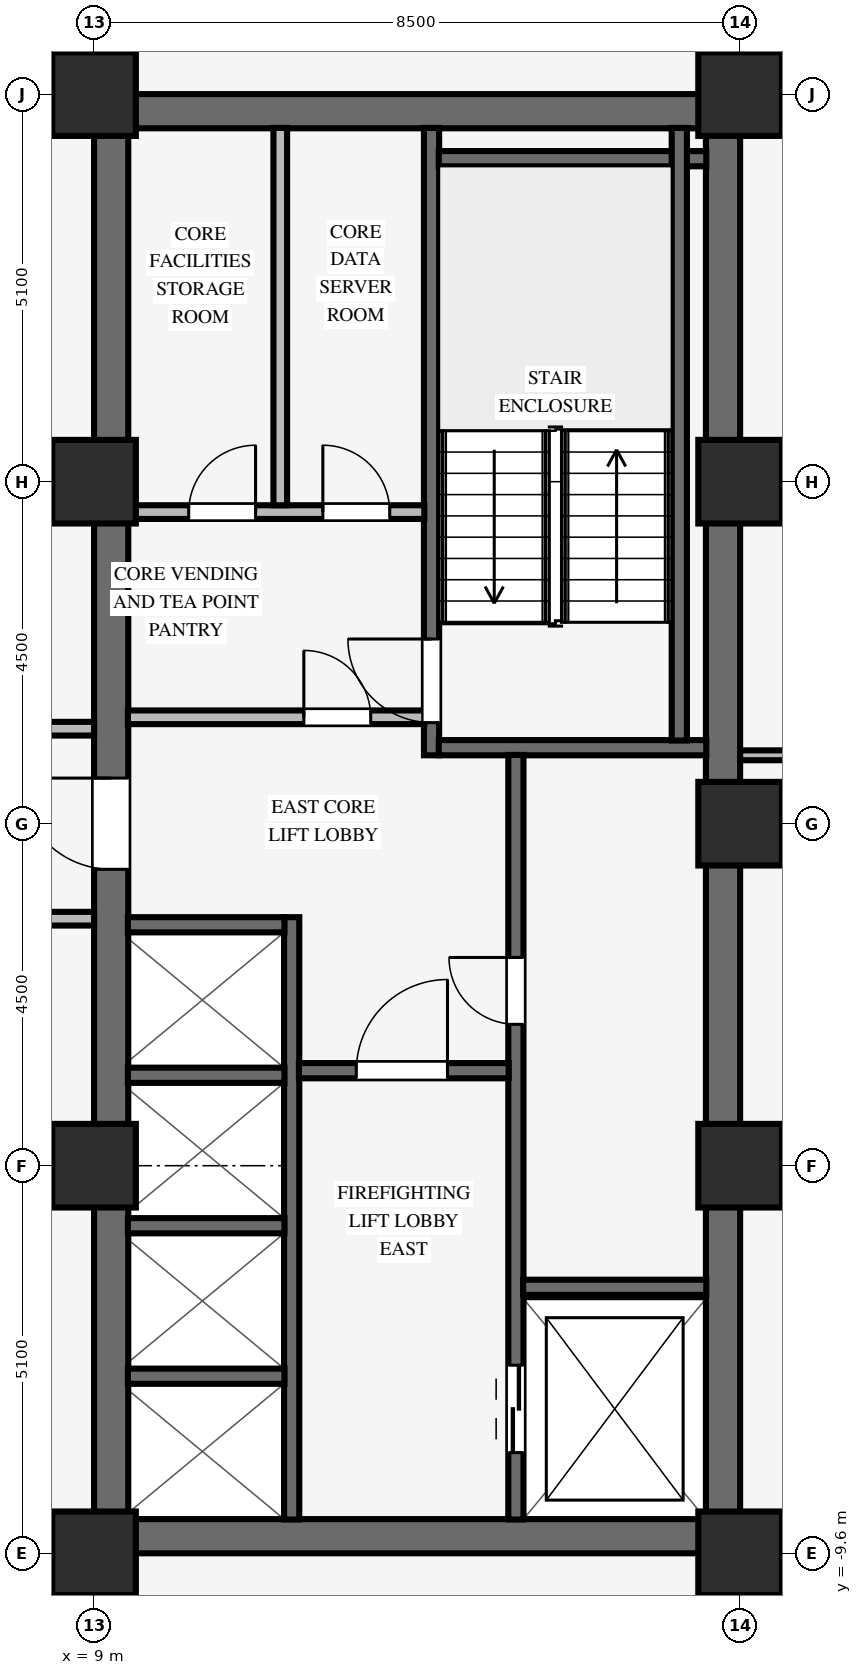
"""IFC4 building model, lengths in metres.
Left out: names, types, materials, properties, quantities, classifications, styles, units other than length and angle.
Written with IfcOpenShell. Run it as: python <this file> out.ifc"""

import sys

from ifc_helpers import new_model, si_unit, direction, frame, frame_2d, origin, origin_2d, place, context, subcontext, project, spatial, rectangle, extrude, source, transform, mapped, element, fill, save


model = new_model("IFC4")
c1 = context("Model", 3, precision=1e-05, world=origin(), true_north=direction((0.0, 1.0)))
c2 = subcontext(c1, "Body", "Model", "MODEL_VIEW")
j1 = project(units=[si_unit("LENGTHUNIT", "METRE"), si_unit("PLANEANGLEUNIT", "RADIAN")], contexts=[c1])
p1 = place(None, origin())
s1 = spatial("IfcSite", under=j1, at=p1, CompositionType="ELEMENT")
p2 = place(p1, origin())
s2 = spatial("IfcBuilding", under=s1, at=p2, CompositionType="ELEMENT")
p3 = place(p2, frame((0.0, 0.0, 67.75)))
s3 = spatial("IfcBuildingStorey", under=s2, at=p3, CompositionType="ELEMENT", Elevation=67.75)
for number, where, z_axis, x_axis in (
    (1, (9.0, -9.375, 0.0), (0.0, 0.0, 1.0), (1.0, 0.0, 0.0)),
    (2, (9.0, 9.375, 0.0), (0.0, 0.0, 1.0), (1.0, 0.0, 0.0)),
):
    element("IfcWall", number, at=place(p3, frame(where, z_axis=z_axis, x_axis=x_axis)), inside=s3, PredefinedType="SHEAR", context=c2, shape_type="SweptSolid", body=[
        extrude(rectangle(XDim=8.5, YDim=0.45, at=frame_2d((4.25, 0.0))), origin(), (0.0, 0.0, 1.0), 3.37),
    ])
p4 = place(p3, frame((9.225, -9.155, 0.0), z_axis=(0.0, 0.0, 1.0), x_axis=(0.0, 1.0, 0.0)))
e3 = element("IfcWall", 3, at=p4, inside=s3, PredefinedType="SHEAR", context=c2, shape_type="SweptSolid", body=[
    extrude(rectangle(XDim=18.31, YDim=0.45, at=frame_2d((9.155, 0.0))), origin(), (0.0, 0.0, 1.0), 3.37),
])
p5 = place(p4, frame((8.555, 0.0, 0.0)))
e4 = element("IfcOpeningElement", 4, at=p5, cuts=e3, PredefinedType="OPENING", context=c2, shape_type="SweptSolid", body=[
    extrude(rectangle(XDim=1.2, YDim=2.15, at=frame_2d((0.6, 1.075))), frame((0.0, 0.235, 0.0), z_axis=(0.0, -1.0, 0.0), x_axis=(1.0, 0.0, 0.0)), (0.0, 0.0, 1.0), 0.47),
])
p6 = place(p3, frame((17.275, -9.155, 0.0), z_axis=(0.0, 0.0, 1.0), x_axis=(0.0, 1.0, 0.0)))
e5 = element("IfcWall", 5, at=p6, inside=s3, PredefinedType="SHEAR", context=c2, shape_type="SweptSolid", body=[
    extrude(rectangle(XDim=18.31, YDim=0.45, at=frame_2d((9.155, 0.0))), origin(), (0.0, 0.0, 1.0), 3.37),
])
for number, where, z_axis, x_axis in (
    (6, (9.0, -9.6, 0.0), (0.0, 0.0, 1.0), (1.0, 0.0, 0.0)),
    (7, (9.0, -4.5, 0.0), (0.0, 0.0, 1.0), (1.0, 0.0, 0.0)),
    (8, (9.0, 4.5, 0.0), (0.0, 0.0, 1.0), (1.0, 0.0, 0.0)),
    (9, (9.0, 9.6, 0.0), (0.0, 0.0, 1.0), (1.0, 0.0, 0.0)),
    (10, (17.5, -9.6, 0.0), (0.0, 0.0, 1.0), (1.0, 0.0, 0.0)),
    (11, (17.5, -4.5, 0.0), (0.0, 0.0, 1.0), (1.0, 0.0, 0.0)),
    (12, (17.5, 4.5, 0.0), (0.0, 0.0, 1.0), (1.0, 0.0, 0.0)),
    (13, (17.5, 9.6, 0.0), (0.0, 0.0, 1.0), (1.0, 0.0, 0.0)),
    (14, (17.5, 0.0, 0.0), (0.0, 0.0, 1.0), (1.0, 0.0, 0.0)),
):
    element("IfcColumn", number, at=place(p3, frame(where, z_axis=z_axis, x_axis=x_axis)), inside=s3, PredefinedType="COLUMN", context=c2, shape_type="SweptSolid", body=[
        extrude(rectangle(XDim=1.1, YDim=1.1, at=origin_2d()), origin(), (0.0, 0.0, 1.0), 3.37),
    ])
p7 = place(p3, frame((13.44, 0.9, 0.0), z_axis=(0.0, 0.0, 1.0), x_axis=(0.0, 1.0, 0.0)))
e15 = element("IfcWall", 15, at=p7, inside=s3, PredefinedType="SHEAR", context=c2, shape_type="SweptSolid", body=[
    extrude(rectangle(XDim=8.255, YDim=0.2, at=frame_2d((4.127, 0.0))), origin(), (0.0, 0.0, 1.0), 3.37),
])
p8 = place(p7, frame((0.43, 0.0, 0.0)))
e16 = element("IfcOpeningElement", 16, at=p8, cuts=e15, PredefinedType="OPENING", context=c2, shape_type="SweptSolid", body=[
    extrude(rectangle(XDim=1.1, YDim=2.15, at=frame_2d((0.55, 1.075))), frame((0.0, 0.11, 0.0), z_axis=(0.0, -1.0, 0.0), x_axis=(1.0, 0.0, 0.0)), (0.0, 0.0, 1.0), 0.22),
])
for number, where, z_axis, x_axis in (
    (17, (13.535, 1.0, 0.0), (0.0, 0.0, 1.0), (1.0, 0.0, 0.0)),
    (18, (13.535, 8.75, 0.0), (0.0, 0.0, 1.0), (1.0, 0.0, 0.0)),
):
    element("IfcWall", number, at=place(p3, frame(where, z_axis=z_axis, x_axis=x_axis)), inside=s3, PredefinedType="SHEAR", context=c2, shape_type="SweptSolid", body=[
        extrude(rectangle(XDim=3.52, YDim=0.2, at=frame_2d((1.76, 0.0))), origin(), (0.0, 0.0, 1.0), 3.37),
    ])
p9 = place(p3, frame((16.7, 1.095, 0.0), z_axis=(0.0, 0.0, 1.0), x_axis=(0.0, 1.0, 0.0)))
e19 = element("IfcWall", 19, at=p9, inside=s3, PredefinedType="SHEAR", context=c2, shape_type="SweptSolid", body=[
    extrude(rectangle(XDim=8.06, YDim=0.2, at=frame_2d((4.03, 0.0))), origin(), (0.0, 0.0, 1.0), 3.37),
])
p10 = place(p3, frame((14.55, -9.155, 0.0), z_axis=(0.0, 0.0, 1.0), x_axis=(0.0, 1.0, 0.0)))
e20 = element("IfcWall", 20, at=p10, inside=s3, PredefinedType="SHEAR", context=c2, shape_type="SweptSolid", body=[
    extrude(rectangle(XDim=10.06, YDim=0.2, at=frame_2d((5.03, 0.0))), origin(), (0.0, 0.0, 1.0), 3.37),
])
p11 = place(p10, frame((6.515, 0.0, 0.0)))
e21 = element("IfcOpeningElement", 21, at=p11, cuts=e20, PredefinedType="OPENING", context=c2, shape_type="SweptSolid", body=[
    extrude(rectangle(XDim=0.88, YDim=2.1, at=frame_2d((0.44, 1.05))), frame((0.0, 0.11, 0.0), z_axis=(0.0, -1.0, 0.0), x_axis=(1.0, 0.0, 0.0)), (0.0, 0.0, 1.0), 0.22),
])
p12 = place(p10, frame((0.88, 0.0, 0.0)))
e22 = element("IfcOpeningElement", 22, at=p12, cuts=e20, PredefinedType="OPENING", context=c2, shape_type="SweptSolid", body=[
    extrude(rectangle(XDim=1.15, YDim=2.15, at=frame_2d((0.575, 1.075))), frame((0.0, 0.11, 0.0), z_axis=(0.0, -1.0, 0.0), x_axis=(1.0, 0.0, 0.0)), (0.0, 0.0, 1.0), 0.22),
])
p13 = place(p3, frame((14.645, -6.1, 0.0), z_axis=(0.0, 0.0, 1.0), x_axis=(1.0, 0.0, 0.0)))
e23 = element("IfcWall", 23, at=p13, inside=s3, PredefinedType="SHEAR", context=c2, shape_type="SweptSolid", body=[
    extrude(rectangle(XDim=2.41, YDim=0.2, at=frame_2d((1.205, 0.0))), origin(), (0.0, 0.0, 1.0), 3.37),
])
p14 = place(p3, frame((11.6, -9.155, 0.0), z_axis=(0.0, 0.0, 1.0), x_axis=(0.0, 1.0, 0.0)))
e24 = element("IfcWall", 24, at=p14, inside=s3, PredefinedType="SHEAR", context=c2, shape_type="SweptSolid", body=[
    extrude(rectangle(XDim=7.925, YDim=0.2, at=frame_2d((3.962, 0.0))), origin(), (0.0, 0.0, 1.0), 3.37),
])
p15 = place(p3, frame((11.695, -3.25, 0.0), z_axis=(0.0, 0.0, 1.0), x_axis=(1.0, 0.0, 0.0)))
e25 = element("IfcWall", 25, at=p15, inside=s3, PredefinedType="SHEAR", context=c2, shape_type="SweptSolid", body=[
    extrude(rectangle(XDim=2.76, YDim=0.2, at=frame_2d((1.38, 0.0))), origin(), (0.0, 0.0, 1.0), 3.37),
])
p16 = place(p15, frame((0.755, 0.0, 0.0)))
e26 = element("IfcOpeningElement", 26, at=p16, cuts=e25, PredefinedType="OPENING", context=c2, shape_type="SweptSolid", body=[
    extrude(rectangle(XDim=1.2, YDim=2.15, at=frame_2d((0.6, 1.075))), frame((0.0, 0.11, 0.0), z_axis=(0.0, -1.0, 0.0), x_axis=(1.0, 0.0, 0.0)), (0.0, 0.0, 1.0), 0.22),
])
for number, where, z_axis, x_axis in (
    (27, (9.445, -7.27, 0.0), (0.0, 0.0, 1.0), (1.0, 0.0, 0.0)),
    (28, (9.445, -5.29, 0.0), (0.0, 0.0, 1.0), (1.0, 0.0, 0.0)),
    (29, (9.445, -3.31, 0.0), (0.0, 0.0, 1.0), (1.0, 0.0, 0.0)),
    (30, (9.445, -1.33, 0.0), (0.0, 0.0, 1.0), (1.0, 0.0, 0.0)),
):
    element("IfcWall", number, at=place(p3, frame(where, z_axis=z_axis, x_axis=x_axis)), inside=s3, PredefinedType="SHEAR", context=c2, shape_type="SweptSolid", body=[
        extrude(rectangle(XDim=2.06, YDim=0.2, at=frame_2d((1.03, 0.0))), origin(), (0.0, 0.0, 1.0), 3.37),
    ])
p17 = place(p3, frame((9.445, 1.4, 0.0), z_axis=(0.0, 0.0, 1.0), x_axis=(1.0, 0.0, 0.0)))
e31 = element("IfcWall", 31, at=p17, inside=s3, PredefinedType="PARTITIONING", context=c2, shape_type="SweptSolid", body=[
    extrude(rectangle(XDim=3.9, YDim=0.18, at=frame_2d((1.95, 0.0))), origin(), (0.0, 0.0, 1.0), 3.36),
])
p18 = place(p17, frame((2.315, 0.0, 0.0)))
e32 = element("IfcOpeningElement", 32, at=p18, cuts=e31, PredefinedType="OPENING", context=c2, shape_type="SweptSolid", body=[
    extrude(rectangle(XDim=0.88, YDim=2.1, at=frame_2d((0.44, 1.05))), frame((0.0, 0.1, 0.0), z_axis=(0.0, -1.0, 0.0), x_axis=(1.0, 0.0, 0.0)), (0.0, 0.0, 1.0), 0.2),
])
p19 = place(p3, frame((9.445, 4.1, 0.0), z_axis=(0.0, 0.0, 1.0), x_axis=(1.0, 0.0, 0.0)))
e33 = element("IfcWall", 33, at=p19, inside=s3, PredefinedType="PARTITIONING", context=c2, shape_type="SweptSolid", body=[
    extrude(rectangle(XDim=3.9, YDim=0.18, at=frame_2d((1.95, 0.0))), origin(), (0.0, 0.0, 1.0), 3.36),
])
p20 = place(p19, frame((0.8, 0.0, 0.0)))
e34 = element("IfcOpeningElement", 34, at=p20, cuts=e33, PredefinedType="OPENING", context=c2, shape_type="SweptSolid", body=[
    extrude(rectangle(XDim=0.88, YDim=2.1, at=frame_2d((0.44, 1.05))), frame((0.0, 0.1, 0.0), z_axis=(0.0, -1.0, 0.0), x_axis=(1.0, 0.0, 0.0)), (0.0, 0.0, 1.0), 0.2),
])
p21 = place(p19, frame((2.565, 0.0, 0.0)))
e35 = element("IfcOpeningElement", 35, at=p21, cuts=e33, PredefinedType="OPENING", context=c2, shape_type="SweptSolid", body=[
    extrude(rectangle(XDim=0.88, YDim=2.1, at=frame_2d((0.44, 1.05))), frame((0.0, 0.1, 0.0), z_axis=(0.0, -1.0, 0.0), x_axis=(1.0, 0.0, 0.0)), (0.0, 0.0, 1.0), 0.2),
])
p22 = place(p3, frame((11.45, 4.19, 0.0), z_axis=(0.0, 0.0, 1.0), x_axis=(0.0, 1.0, 0.0)))
e36 = element("IfcWall", 36, at=p22, inside=s3, PredefinedType="PARTITIONING", context=c2, shape_type="SweptSolid", body=[
    extrude(rectangle(XDim=4.965, YDim=0.18, at=frame_2d((2.482, 0.0))), origin(), (0.0, 0.0, 1.0), 3.36),
])
p23 = place(p3, frame((0.176, -9.6, 0.0), z_axis=(0.0, 0.0, 1.0), x_axis=(1.0, 0.0, 0.0)))
e37 = element("IfcWall", 37, at=p23, inside=s3, PredefinedType="PARTITIONING", context=c2, shape_type="SweptSolid", body=[
    extrude(rectangle(XDim=8.278, YDim=0.18, at=frame_2d((4.139, 0.0))), origin(), (0.0, 0.0, 1.0), 2.405),
])
p24 = place(p3, frame((-0.8, -1.25, 0.0), z_axis=(0.0, 0.0, 1.0), x_axis=(1.0, 0.0, 0.0)))
e38 = element("IfcWall", 38, at=p24, inside=s3, PredefinedType="PARTITIONING", context=c2, shape_type="SweptSolid", body=[
    extrude(rectangle(XDim=9.8, YDim=0.18, at=frame_2d((4.9, 0.0))), origin(), (0.0, 0.0, 1.0), 3.36),
])
p25 = place(p24, frame((6.37, 0.0, 0.0)))
e39 = element("IfcOpeningElement", 39, at=p25, cuts=e38, PredefinedType="OPENING", context=c2, shape_type="SweptSolid", body=[
    extrude(rectangle(XDim=0.96, YDim=2.1, at=frame_2d((0.48, 1.05))), frame((0.0, 0.1, 0.0), z_axis=(0.0, -1.0, 0.0), x_axis=(1.0, 0.0, 0.0)), (0.0, 0.0, 1.0), 0.2),
])
p26 = place(p3, frame((17.5, 0.9, 0.0), z_axis=(0.0, 0.0, 1.0), x_axis=(1.0, 0.0, 0.0)))
e40 = element("IfcWall", 40, at=p26, inside=s3, PredefinedType="PARTITIONING", context=c2, shape_type="SweptSolid", body=[
    extrude(rectangle(XDim=3.66, YDim=0.13, at=frame_2d((1.83, 0.0))), origin(), (0.0, 0.0, 1.0), 3.36),
])
p27 = place(p3, frame((-0.8, 1.25, 0.0), z_axis=(0.0, 0.0, 1.0), x_axis=(1.0, 0.0, 0.0)))
e41 = element("IfcWall", 41, at=p27, inside=s3, PredefinedType="PARTITIONING", context=c2, shape_type="SweptSolid", body=[
    extrude(rectangle(XDim=9.8, YDim=0.18, at=frame_2d((4.9, 0.0))), origin(), (0.0, 0.0, 1.0), 3.36),
])
p28 = place(p27, frame((4.42, 0.0, 0.0)))
e42 = element("IfcOpeningElement", 42, at=p28, cuts=e41, PredefinedType="OPENING", context=c2, shape_type="SweptSolid", body=[
    extrude(rectangle(XDim=0.96, YDim=2.1, at=frame_2d((0.48, 1.05))), frame((0.0, 0.1, 0.0), z_axis=(0.0, -1.0, 0.0), x_axis=(1.0, 0.0, 0.0)), (0.0, 0.0, 1.0), 0.2),
])
p29 = place(p3, frame((0.176, 9.6, 0.0), z_axis=(0.0, 0.0, 1.0), x_axis=(1.0, 0.0, 0.0)))
e43 = element("IfcWall", 43, at=p29, inside=s3, PredefinedType="PARTITIONING", context=c2, shape_type="SweptSolid", body=[
    extrude(rectangle(XDim=8.278, YDim=0.18, at=frame_2d((4.139, 0.0))), origin(), (0.0, 0.0, 1.0), 2.405),
])
for number, where, z_axis, x_axis in (
    (44, (17.5, -11.114, 0.0), (0.0, 0.0, 1.0), (0.0, 1.0, 0.0)),
    (45, (17.5, 10.146, 0.0), (0.0, 0.0, 1.0), (0.0, 1.0, 0.0)),
):
    element("IfcWall", number, at=place(p3, frame(where, z_axis=z_axis, x_axis=x_axis)), inside=s3, PredefinedType="PARTITIONING", context=c2, shape_type="SweptSolid", body=[
        extrude(rectangle(XDim=0.968, YDim=0.18, at=frame_2d((0.484, 0.0))), origin(), (0.0, 0.0, 1.0), 2.738),
    ])
m1 = source(origin(), c2, "Body", "SweptSolid", [
    extrude(rectangle(XDim=1.1, YDim=2.15, at=frame_2d((0.55, 1.075))), frame((0.0, 0.025, 0.0), z_axis=(0.0, -1.0, 0.0), x_axis=(1.0, 0.0, 0.0)), (0.0, 0.0, 1.0), 0.05),
])
p30 = place(p8, origin())
e46 = element("IfcDoor", 46, at=p30, inside=s3, OperationType="SINGLE_SWING_RIGHT", PredefinedType="DOOR", context=c2, shape_type="MappedRepresentation", body=[
    mapped(m1, transform((0.0, 0.0, 0.0), scale=1.0)),
])
fill(e16, e46)
m2 = source(origin(), c2, "Body", "SweptSolid", [
    extrude(rectangle(XDim=0.88, YDim=2.1, at=frame_2d((0.44, 1.05))), frame((0.0, 0.025, 0.0), z_axis=(0.0, -1.0, 0.0), x_axis=(1.0, 0.0, 0.0)), (0.0, 0.0, 1.0), 0.05),
])
p31 = place(p11, origin())
e47 = element("IfcDoor", 47, at=p31, inside=s3, OperationType="SINGLE_SWING_RIGHT", PredefinedType="DOOR", context=c2, shape_type="MappedRepresentation", body=[
    mapped(m2, transform((0.0, 0.0, 0.0), scale=1.0)),
])
fill(e21, e47)
m3 = source(origin(), c2, "Body", "SweptSolid", [
    extrude(rectangle(XDim=1.2, YDim=2.15, at=frame_2d((0.6, 1.075))), frame((0.0, 0.025, 0.0), z_axis=(0.0, -1.0, 0.0), x_axis=(1.0, 0.0, 0.0)), (0.0, 0.0, 1.0), 0.05),
])
p32 = place(p16, origin())
e48 = element("IfcDoor", 48, at=p32, inside=s3, OperationType="SINGLE_SWING_RIGHT", PredefinedType="DOOR", context=c2, shape_type="MappedRepresentation", body=[
    mapped(m3, transform((0.0, 0.0, 0.0), scale=1.0)),
])
fill(e26, e48)
p33 = place(p5, origin())
e49 = element("IfcDoor", 49, at=p33, inside=s3, OperationType="SINGLE_SWING_RIGHT", PredefinedType="DOOR", context=c2, shape_type="MappedRepresentation", body=[
    mapped(m3, transform((0.0, 0.0, 0.0), scale=1.0)),
])
fill(e4, e49)
p34 = place(p18, origin())
e50 = element("IfcDoor", 50, at=p34, inside=s3, OperationType="SINGLE_SWING_LEFT", PredefinedType="DOOR", context=c2, shape_type="MappedRepresentation", body=[
    mapped(m2, transform((0.0, 0.0, 0.0), scale=1.0)),
])
fill(e32, e50)
p35 = place(p20, origin())
e51 = element("IfcDoor", 51, at=p35, inside=s3, OperationType="SINGLE_SWING_RIGHT", PredefinedType="DOOR", context=c2, shape_type="MappedRepresentation", body=[
    mapped(m2, transform((0.0, 0.0, 0.0), scale=1.0)),
])
fill(e34, e51)
p36 = place(p21, origin())
e52 = element("IfcDoor", 52, at=p36, inside=s3, OperationType="SINGLE_SWING_LEFT", PredefinedType="DOOR", context=c2, shape_type="MappedRepresentation", body=[
    mapped(m2, transform((0.0, 0.0, 0.0), scale=1.0)),
])
fill(e35, e52)
m4 = source(origin(), c2, "Body", "SweptSolid", [
    extrude(rectangle(XDim=1.15, YDim=2.15, at=frame_2d((0.575, 1.075))), frame((0.0, 0.025, 0.0), z_axis=(0.0, -1.0, 0.0), x_axis=(1.0, 0.0, 0.0)), (0.0, 0.0, 1.0), 0.05),
])
p37 = place(p12, origin())
e53 = element("IfcDoor", 53, at=p37, inside=s3, OperationType="DOUBLE_DOOR_SLIDING", PredefinedType="DOOR", context=c2, shape_type="MappedRepresentation", body=[
    mapped(m4, transform((0.0, 0.0, 0.0), scale=1.0)),
])
fill(e22, e53)
save(model, sys.argv[1])
